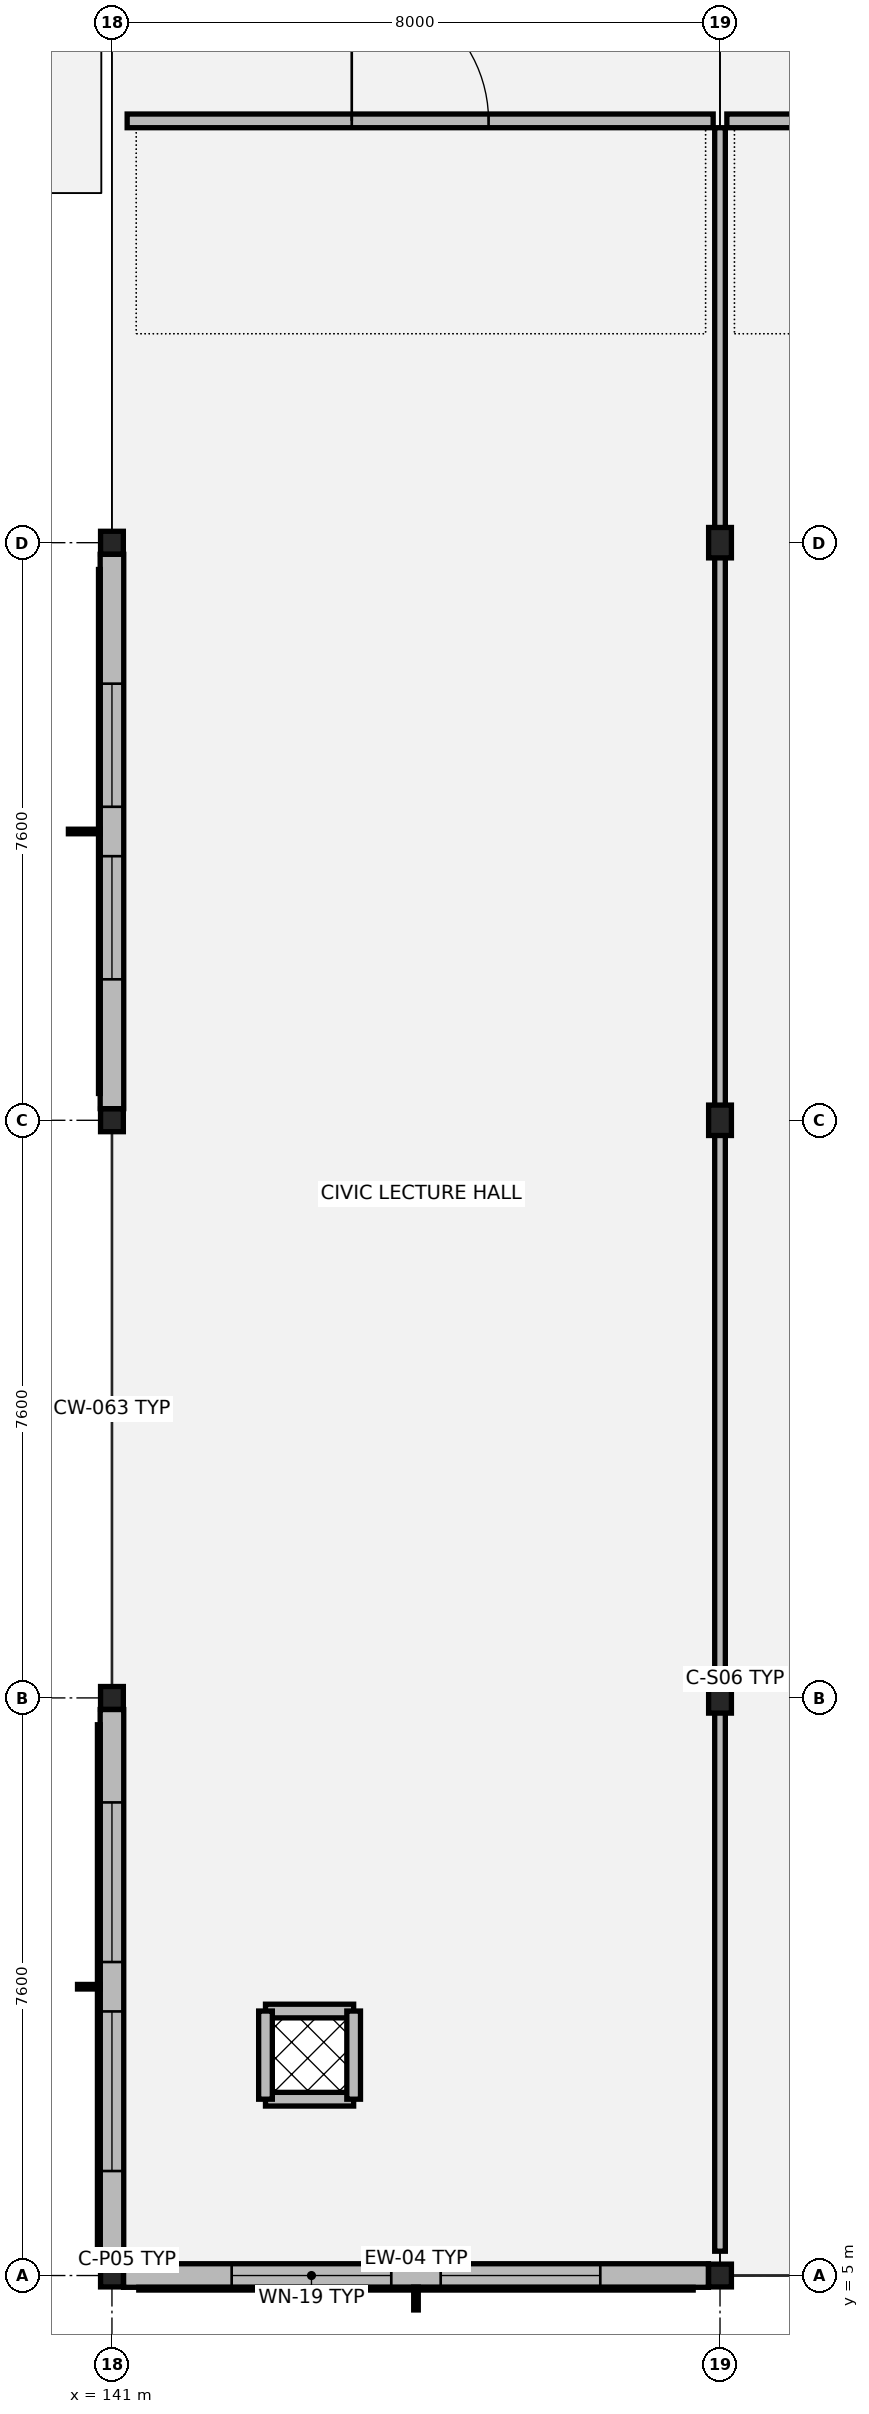
"""IFC4 building model, lengths in metres.
Left out: names, types, materials, properties, quantities, classifications, styles, units other than length and angle.
Written with IfcOpenShell. Run it as: python <this file> out.ifc"""

import sys

from ifc_helpers import new_model, si_unit, direction, frame, frame_2d, origin, origin_2d, place, context, subcontext, project, spatial, rectangle, hollow_rectangle, i_section, extrude, element, fill, save


model = new_model("IFC4")
c1 = context("Model", 3, precision=1e-05, world=origin(), true_north=direction((0.0, 1.0)))
c2 = subcontext(c1, "Body", "Model", "MODEL_VIEW")
j1 = project(units=[si_unit("LENGTHUNIT", "METRE"), si_unit("PLANEANGLEUNIT", "RADIAN")], contexts=[c1])
p1 = place(None, origin())
s1 = spatial("IfcSite", under=j1, at=p1, CompositionType="ELEMENT")
p2 = place(p1, origin())
s2 = spatial("IfcBuilding", under=s1, at=p2, CompositionType="ELEMENT")
p3 = place(p2, frame((0.0, 0.0, 5.1)))
s3 = spatial("IfcBuildingStorey", under=s2, at=p3, CompositionType="ELEMENT", Elevation=5.1)
for number, where, z_axis, x_axis in (
    (1, (141.0, 5.0, 0.0), (0.0, 0.0, 1.0), (1.0, 0.0, 0.0)),
    (2, (141.0, 12.6, 0.0), (0.0, 0.0, 1.0), (1.0, 0.0, 0.0)),
    (3, (141.0, 20.2, 0.0), (0.0, 0.0, 1.0), (1.0, 0.0, 0.0)),
    (4, (141.0, 27.8, 0.0), (0.0, 0.0, 1.0), (1.0, 0.0, 0.0)),
    (5, (149.0, 5.0, 0.0), (0.0, 0.0, 1.0), (1.0, 0.0, 0.0)),
):
    element("IfcColumn", number, at=place(p3, frame(where, z_axis=z_axis, x_axis=x_axis)), inside=s3, PredefinedType="COLUMN", context=c2, shape_type="SweptSolid", body=[
        extrude(hollow_rectangle(XDim=0.3, YDim=0.3, WallThickness=0.012, at=origin_2d()), origin(), (0.0, 0.0, 1.0), 4.055),
    ])
for number, where, z_axis, x_axis in (
    (6, (149.0, 12.6, 0.0), (0.0, 0.0, 1.0), (1.0, 0.0, 0.0)),
    (7, (149.0, 20.2, 0.0), (0.0, 0.0, 1.0), (1.0, 0.0, 0.0)),
    (8, (149.0, 27.8, 0.0), (0.0, 0.0, 1.0), (1.0, 0.0, 0.0)),
):
    element("IfcColumn", number, at=place(p3, frame(where, z_axis=z_axis, x_axis=x_axis)), inside=s3, PredefinedType="COLUMN", context=c2, shape_type="SweptSolid", body=[
        extrude(i_section(OverallWidth=0.3, OverallDepth=0.4, WebThickness=0.013, FlangeThickness=0.024, at=origin_2d()), origin(), (0.0, 0.0, 1.0), 4.055),
    ])
p4 = place(p3, frame((141.153, 5.0, 0.0), z_axis=(0.0, 0.0, 1.0), x_axis=(1.0, 0.0, 0.0)))
e9 = element("IfcWall", 9, at=p4, inside=s3, PredefinedType="SOLIDWALL", context=c2, shape_type="SweptSolid", body=[
    extrude(rectangle(XDim=7.694, YDim=0.31, at=frame_2d((3.847, 0.0))), origin(), (0.0, 0.0, 1.0), 3.48),
])
p5 = place(p4, frame((1.422, 0.0, 0.8)))
e10 = element("IfcOpeningElement", 10, at=p5, cuts=e9, PredefinedType="OPENING", context=c2, shape_type="SweptSolid", body=[
    extrude(rectangle(XDim=2.1, YDim=2.25, at=frame_2d((1.05, 1.125))), frame((0.0, 0.165, 0.0), z_axis=(0.0, -1.0, 0.0), x_axis=(1.0, 0.0, 0.0)), (0.0, 0.0, 1.0), 0.33),
])
p6 = place(p4, frame((4.172, 0.0, 0.8)))
e11 = element("IfcOpeningElement", 11, at=p6, cuts=e9, PredefinedType="OPENING", context=c2, shape_type="SweptSolid", body=[
    extrude(rectangle(XDim=2.1, YDim=2.25, at=frame_2d((1.05, 1.125))), frame((0.0, 0.165, 0.0), z_axis=(0.0, -1.0, 0.0), x_axis=(1.0, 0.0, 0.0)), (0.0, 0.0, 1.0), 0.33),
])
p7 = place(p3, frame((141.0, 27.647, 0.0), z_axis=(0.0, 0.0, 1.0), x_axis=(0.0, -1.0, 0.0)))
e12 = element("IfcWall", 12, at=p7, inside=s3, PredefinedType="SOLIDWALL", context=c2, shape_type="SweptSolid", body=[
    extrude(rectangle(XDim=7.294, YDim=0.31, at=frame_2d((3.647, 0.0))), origin(), (0.0, 0.0, 1.0), 3.48),
])
p8 = place(p7, frame((1.702, 0.0, 0.8)))
e13 = element("IfcOpeningElement", 13, at=p8, cuts=e12, PredefinedType="OPENING", context=c2, shape_type="SweptSolid", body=[
    extrude(rectangle(XDim=1.62, YDim=2.06, at=frame_2d((0.81, 1.03))), frame((0.0, 0.165, 0.0), z_axis=(0.0, -1.0, 0.0), x_axis=(1.0, 0.0, 0.0)), (0.0, 0.0, 1.0), 0.33),
])
p9 = place(p7, frame((3.972, 0.0, 0.8)))
e14 = element("IfcOpeningElement", 14, at=p9, cuts=e12, PredefinedType="OPENING", context=c2, shape_type="SweptSolid", body=[
    extrude(rectangle(XDim=1.62, YDim=2.06, at=frame_2d((0.81, 1.03))), frame((0.0, 0.165, 0.0), z_axis=(0.0, -1.0, 0.0), x_axis=(1.0, 0.0, 0.0)), (0.0, 0.0, 1.0), 0.33),
])
p10 = place(p3, frame((141.0, 12.447, 0.0), z_axis=(0.0, 0.0, 1.0), x_axis=(0.0, -1.0, 0.0)))
e15 = element("IfcWall", 15, at=p10, inside=s3, PredefinedType="SOLIDWALL", context=c2, shape_type="SweptSolid", body=[
    extrude(rectangle(XDim=7.294, YDim=0.31, at=frame_2d((3.647, 0.0))), origin(), (0.0, 0.0, 1.0), 3.48),
])
p11 = place(p10, frame((1.222, 0.0, 0.8)))
e16 = element("IfcOpeningElement", 16, at=p11, cuts=e15, PredefinedType="OPENING", context=c2, shape_type="SweptSolid", body=[
    extrude(rectangle(XDim=2.1, YDim=2.25, at=frame_2d((1.05, 1.125))), frame((0.0, 0.165, 0.0), z_axis=(0.0, -1.0, 0.0), x_axis=(1.0, 0.0, 0.0)), (0.0, 0.0, 1.0), 0.33),
])
p12 = place(p10, frame((3.972, 0.0, 0.8)))
e17 = element("IfcOpeningElement", 17, at=p12, cuts=e15, PredefinedType="OPENING", context=c2, shape_type="SweptSolid", body=[
    extrude(rectangle(XDim=2.1, YDim=2.25, at=frame_2d((1.05, 1.125))), frame((0.0, 0.165, 0.0), z_axis=(0.0, -1.0, 0.0), x_axis=(1.0, 0.0, 0.0)), (0.0, 0.0, 1.0), 0.33),
])
for number, where, z_axis, x_axis in (
    (18, (143.02, 7.32, 0.0), (0.0, 0.0, 1.0), (1.0, 0.0, 0.0)),
    (19, (144.18, 8.48, 0.0), (0.0, 0.0, 1.0), (-1.0, 0.0, 0.0)),
    (20, (143.02, 8.48, 0.0), (0.0, 0.0, 1.0), (0.0, -1.0, 0.0)),
    (21, (144.18, 7.32, 0.0), (0.0, 0.0, 1.0), (0.0, 1.0, 0.0)),
):
    element("IfcWall", number, at=place(p3, frame(where, z_axis=z_axis, x_axis=x_axis)), inside=s3, PredefinedType="PARTITIONING", context=c2, shape_type="SweptSolid", body=[
        extrude(rectangle(XDim=1.16, YDim=0.18, at=frame_2d((0.58, 0.0))), origin(), (0.0, 0.0, 1.0), 3.18),
    ])
p13 = place(p3, frame((141.2, 33.35, 0.0), z_axis=(0.0, 0.0, 1.0), x_axis=(1.0, 0.0, 0.0)))
e22 = element("IfcWall", 22, at=p13, inside=s3, PredefinedType="PARTITIONING", context=c2, shape_type="SweptSolid", body=[
    extrude(rectangle(XDim=7.71, YDim=0.18, at=frame_2d((3.855, 0.0))), origin(), (0.0, 0.0, 1.0), 3.18),
])
p14 = place(p13, frame((2.955, 0.0, 0.0)))
e23 = element("IfcOpeningElement", 23, at=p14, cuts=e22, PredefinedType="OPENING", context=c2, shape_type="SweptSolid", body=[
    extrude(rectangle(XDim=1.8, YDim=2.3, at=frame_2d((0.9, 1.15))), frame((0.0, 0.1, 0.0), z_axis=(0.0, -1.0, 0.0), x_axis=(1.0, 0.0, 0.0)), (0.0, 0.0, 1.0), 0.2),
])
p15 = place(p3, frame((149.09, 33.35, 0.0), z_axis=(0.0, 0.0, 1.0), x_axis=(1.0, 0.0, 0.0)))
e24 = element("IfcWall", 24, at=p15, inside=s3, PredefinedType="PARTITIONING", context=c2, shape_type="SweptSolid", body=[
    extrude(rectangle(XDim=8.46, YDim=0.18, at=frame_2d((4.23, 0.0))), origin(), (0.0, 0.0, 1.0), 3.18),
])
p16 = place(p15, frame((3.53, 0.0, 0.0)))
e25 = element("IfcOpeningElement", 25, at=p16, cuts=e24, PredefinedType="OPENING", context=c2, shape_type="SweptSolid", body=[
    extrude(rectangle(XDim=1.4, YDim=2.22, at=frame_2d((0.7, 1.11))), frame((0.0, 0.1, 0.0), z_axis=(0.0, -1.0, 0.0), x_axis=(1.0, 0.0, 0.0)), (0.0, 0.0, 1.0), 0.2),
])
p17 = place(p3, frame((149.0, 5.32, 0.0), z_axis=(0.0, 0.0, 1.0), x_axis=(0.0, 1.0, 0.0)))
e26 = element("IfcWall", 26, at=p17, inside=s3, PredefinedType="PARTITIONING", context=c2, shape_type="SweptSolid", body=[
    extrude(rectangle(XDim=27.94, YDim=0.14, at=frame_2d((13.97, 0.0))), origin(), (0.0, 0.0, 1.0), 3.18),
])
p18 = place(p5, origin())
e27 = element("IfcWindow", 27, at=p18, inside=s3, PartitioningType="SINGLE_PANEL", PredefinedType="WINDOW", context=c2, shape_type="SweptSolid", body=[
    extrude(rectangle(XDim=2.1, YDim=2.25, at=frame_2d((1.05, 1.125))), frame((0.0, 0.03, 0.0), z_axis=(0.0, -1.0, 0.0), x_axis=(1.0, 0.0, 0.0)), (0.0, 0.0, 1.0), 0.06),
])
fill(e10, e27)
p19 = place(p6, origin())
e28 = element("IfcWindow", 28, at=p19, inside=s3, PartitioningType="SINGLE_PANEL", PredefinedType="WINDOW", context=c2, shape_type="SweptSolid", body=[
    extrude(rectangle(XDim=2.1, YDim=2.25, at=frame_2d((1.05, 1.125))), frame((0.0, 0.03, 0.0), z_axis=(0.0, -1.0, 0.0), x_axis=(1.0, 0.0, 0.0)), (0.0, 0.0, 1.0), 0.06),
])
fill(e11, e28)
p20 = place(p8, origin())
e29 = element("IfcWindow", 29, at=p20, inside=s3, PartitioningType="SINGLE_PANEL", PredefinedType="WINDOW", context=c2, shape_type="SweptSolid", body=[
    extrude(rectangle(XDim=1.62, YDim=2.06, at=frame_2d((0.81, 1.03))), frame((0.0, 0.03, 0.0), z_axis=(0.0, -1.0, 0.0), x_axis=(1.0, 0.0, 0.0)), (0.0, 0.0, 1.0), 0.06),
])
fill(e13, e29)
p21 = place(p9, origin())
e30 = element("IfcWindow", 30, at=p21, inside=s3, PartitioningType="SINGLE_PANEL", PredefinedType="WINDOW", context=c2, shape_type="SweptSolid", body=[
    extrude(rectangle(XDim=1.62, YDim=2.06, at=frame_2d((0.81, 1.03))), frame((0.0, 0.03, 0.0), z_axis=(0.0, -1.0, 0.0), x_axis=(1.0, 0.0, 0.0)), (0.0, 0.0, 1.0), 0.06),
])
fill(e14, e30)
p22 = place(p11, origin())
e31 = element("IfcWindow", 31, at=p22, inside=s3, PartitioningType="SINGLE_PANEL", PredefinedType="WINDOW", context=c2, shape_type="SweptSolid", body=[
    extrude(rectangle(XDim=2.1, YDim=2.25, at=frame_2d((1.05, 1.125))), frame((0.0, 0.03, 0.0), z_axis=(0.0, -1.0, 0.0), x_axis=(1.0, 0.0, 0.0)), (0.0, 0.0, 1.0), 0.06),
])
fill(e16, e31)
p23 = place(p12, origin())
e32 = element("IfcWindow", 32, at=p23, inside=s3, PartitioningType="SINGLE_PANEL", PredefinedType="WINDOW", context=c2, shape_type="SweptSolid", body=[
    extrude(rectangle(XDim=2.1, YDim=2.25, at=frame_2d((1.05, 1.125))), frame((0.0, 0.03, 0.0), z_axis=(0.0, -1.0, 0.0), x_axis=(1.0, 0.0, 0.0)), (0.0, 0.0, 1.0), 0.06),
])
fill(e17, e32)
p24 = place(p14, origin())
e33 = element("IfcDoor", 33, at=p24, inside=s3, OperationType="DOUBLE_DOOR_SINGLE_SWING", PredefinedType="DOOR", context=c2, shape_type="SweptSolid", body=[
    extrude(rectangle(XDim=1.8, YDim=2.3, at=frame_2d((0.9, 1.15))), frame((0.0, 0.025, 0.0), z_axis=(0.0, -1.0, 0.0), x_axis=(1.0, 0.0, 0.0)), (0.0, 0.0, 1.0), 0.05),
])
fill(e23, e33)
save(model, sys.argv[1])
